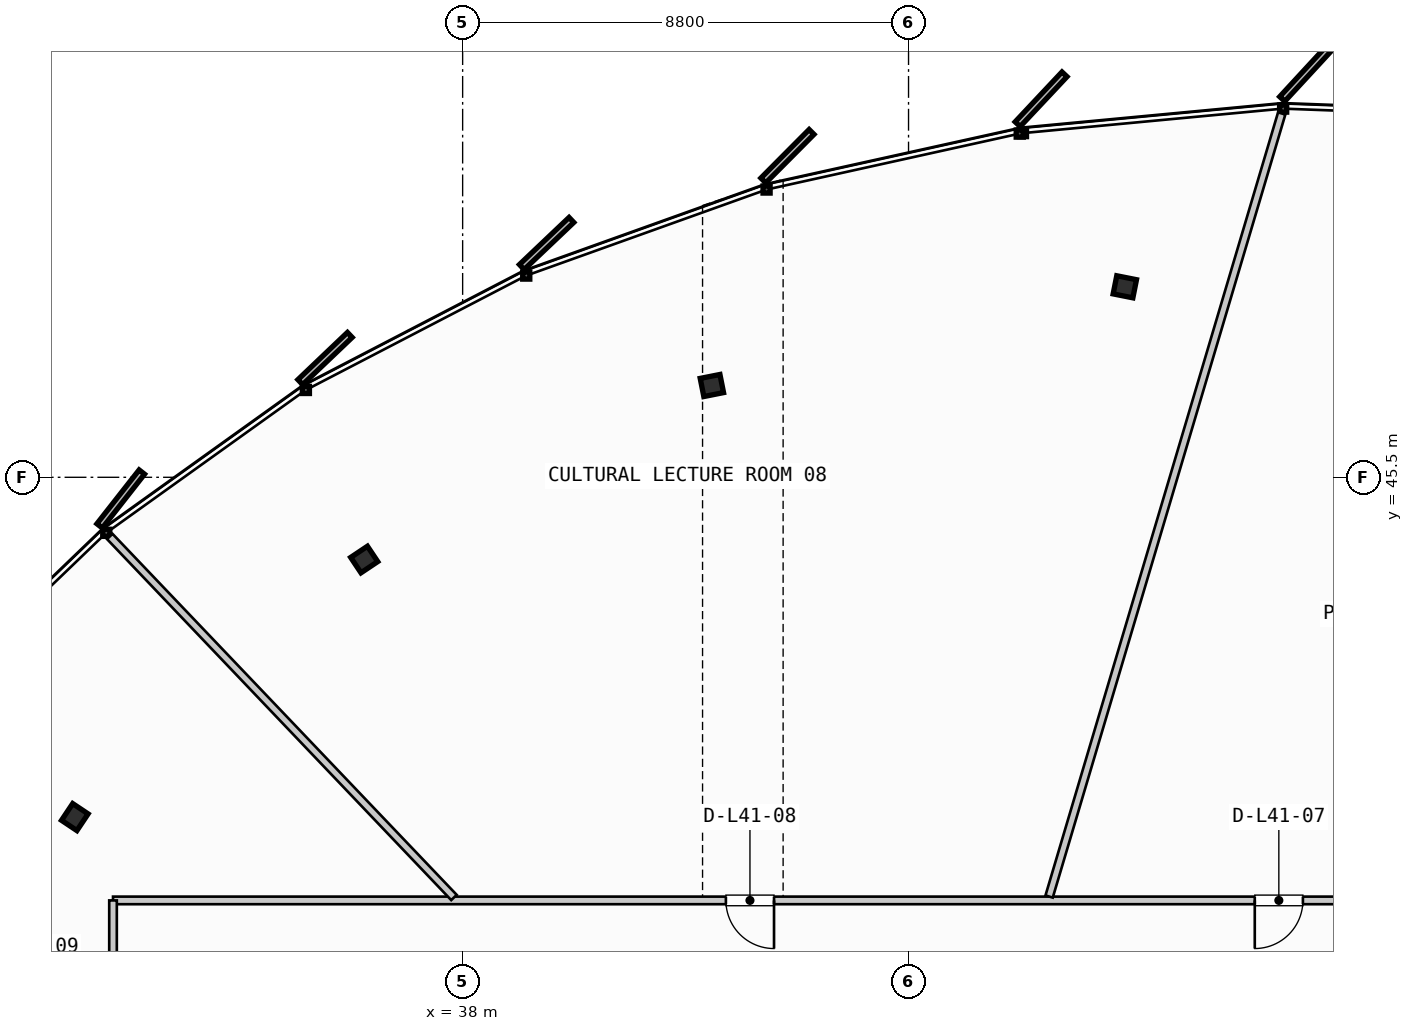
"""IFC4 building model, lengths in metres.
Left out: names, types, materials, properties, quantities, classifications, styles, units other than length and angle.
Written with IfcOpenShell. Run it as: python <this file> out.ifc"""

import sys

from ifc_helpers import new_model, si_unit, direction, frame, frame_2d, origin, origin_2d, place, context, subcontext, project, spatial, rectangle, i_section, extrude, source, transform, mapped, element, fill, save


model = new_model("IFC4")
c1 = context("Model", 3, precision=1e-05, world=origin(), true_north=direction((0.0, 1.0)))
c2 = subcontext(c1, "Body", "Model", "MODEL_VIEW")
j1 = project(units=[si_unit("LENGTHUNIT", "METRE"), si_unit("PLANEANGLEUNIT", "RADIAN")], contexts=[c1])
p1 = place(None, origin())
s1 = spatial("IfcSite", under=j1, at=p1, CompositionType="ELEMENT")
p2 = place(p1, origin())
s2 = spatial("IfcBuilding", under=s1, at=p2, CompositionType="ELEMENT")
p3 = place(p2, frame((0.0, 0.0, 160.75)))
s3 = spatial("IfcBuildingStorey", under=s2, at=p3, CompositionType="ELEMENT", Elevation=160.75)
m1 = source(origin(), c2, "Body", "SweptSolid", [
    extrude(i_section(OverallWidth=0.397, OverallDepth=0.365, WebThickness=0.028, FlangeThickness=0.044, FilletRadius=0.015, at=origin_2d()), origin(), (0.0, 0.0, 1.0), 3.3),
])
for number, where, z_axis, x_axis in (
    (1, (51.069, 49.259, 0.0), (0.0, 0.0, 1.0), (0.195, 0.981, 0.0)),
    (2, (42.919, 47.311, 0.0), (0.0, 0.0, 1.0), (-0.195, 0.981, 0.0)),
    (3, (36.058, 43.877, 0.0), (0.0, 0.0, 1.0), (-0.556, 0.831, 0.0)),
    (4, (30.346, 38.794, 0.0), (0.0, 0.0, 1.0), (-0.831, 0.556, 0.0)),
):
    element("IfcColumn", number, at=place(p3, frame(where, z_axis=z_axis, x_axis=x_axis)), inside=s3, PredefinedType="COLUMN", context=c2, shape_type="MappedRepresentation", body=[
        mapped(m1, transform((0.0, 0.0, 0.0), scale=1.0)),
    ])
p4 = place(p3, frame((62.5, 37.15, 0.0), z_axis=(0.0, 0.0, 1.0), x_axis=(-1.0, 0.0, 0.0)))
e5 = element("IfcWall", 5, at=p4, inside=s3, PredefinedType="PARTITIONING", context=c2, shape_type="SweptSolid", body=[
    extrude(rectangle(XDim=31.4, YDim=0.15, at=frame_2d((15.7, 0.0))), origin(), (0.0, 0.0, 1.0), 2.28),
])
p5 = place(p4, frame((7.917, 0.0, 0.0)))
e6 = element("IfcOpeningElement", 6, at=p5, cuts=e5, PredefinedType="OPENING", context=c2, shape_type="SweptSolid", body=[
    extrude(rectangle(XDim=0.95, YDim=2.15, at=frame_2d((0.475, 1.075))), frame((0.0, 0.085, 0.0), z_axis=(0.0, -1.0, 0.0), x_axis=(1.0, 0.0, 0.0)), (0.0, 0.0, 1.0), 0.17),
])
p6 = place(p4, frame((18.354, 0.0, 0.0)))
e7 = element("IfcOpeningElement", 7, at=p6, cuts=e5, PredefinedType="OPENING", context=c2, shape_type="SweptSolid", body=[
    extrude(rectangle(XDim=0.95, YDim=2.15, at=frame_2d((0.475, 1.075))), frame((0.0, 0.085, 0.0), z_axis=(0.0, -1.0, 0.0), x_axis=(1.0, 0.0, 0.0)), (0.0, 0.0, 1.0), 0.17),
])
p7 = place(p3, frame((31.1, 37.15, 0.0), z_axis=(0.0, 0.0, 1.0), x_axis=(0.0, -1.0, 0.0)))
e8 = element("IfcWall", 8, at=p7, inside=s3, PredefinedType="PARTITIONING", context=c2, shape_type="SweptSolid", body=[
    extrude(rectangle(XDim=1.7, YDim=0.15, at=frame_2d((0.85, 0.0))), origin(), (0.0, 0.0, 1.0), 2.28),
])
p8 = place(p3, frame((49.575, 37.227, 0.0), z_axis=(0.0, 0.0, 1.0), x_axis=(0.284737466757, 0.958605536717, 0.0)))
e9 = element("IfcWall", 9, at=p8, inside=s3, PredefinedType="PARTITIONING", context=c2, shape_type="SweptSolid", body=[
    extrude(rectangle(XDim=16.12, YDim=0.15, at=frame_2d((8.06, 0.0))), origin(), (0.0, 0.0, 1.0), 2.28),
])
p9 = place(p3, frame((37.829, 37.208, 0.0), z_axis=(0.0, 0.0, 1.0), x_axis=(-0.690078052701, 0.723734952299, 0.0)))
e10 = element("IfcWall", 10, at=p9, inside=s3, PredefinedType="PARTITIONING", context=c2, shape_type="SweptSolid", body=[
    extrude(rectangle(XDim=9.844, YDim=0.15, at=frame_2d((4.922, 0.0))), origin(), (0.0, 0.0, 1.0), 2.28),
])
m2 = source(origin(), c2, "Body", "SweptSolid", [
    extrude(rectangle(XDim=0.95, YDim=2.15, at=frame_2d((0.475, 1.075))), frame((0.0, 0.025, 0.0), z_axis=(0.0, -1.0, 0.0), x_axis=(1.0, 0.0, 0.0)), (0.0, 0.0, 1.0), 0.05),
])
p10 = place(p5, origin())
e11 = element("IfcDoor", 11, at=p10, inside=s3, OperationType="SINGLE_SWING_RIGHT", PredefinedType="DOOR", context=c2, shape_type="MappedRepresentation", body=[
    mapped(m2, transform((0.0, 0.0, 0.0), scale=1.0)),
])
fill(e6, e11)
p11 = place(p6, origin())
e12 = element("IfcDoor", 12, at=p11, inside=s3, OperationType="SINGLE_SWING_LEFT", PredefinedType="DOOR", context=c2, shape_type="MappedRepresentation", body=[
    mapped(m2, transform((0.0, 0.0, 0.0), scale=1.0)),
])
fill(e7, e12)
save(model, sys.argv[1])
